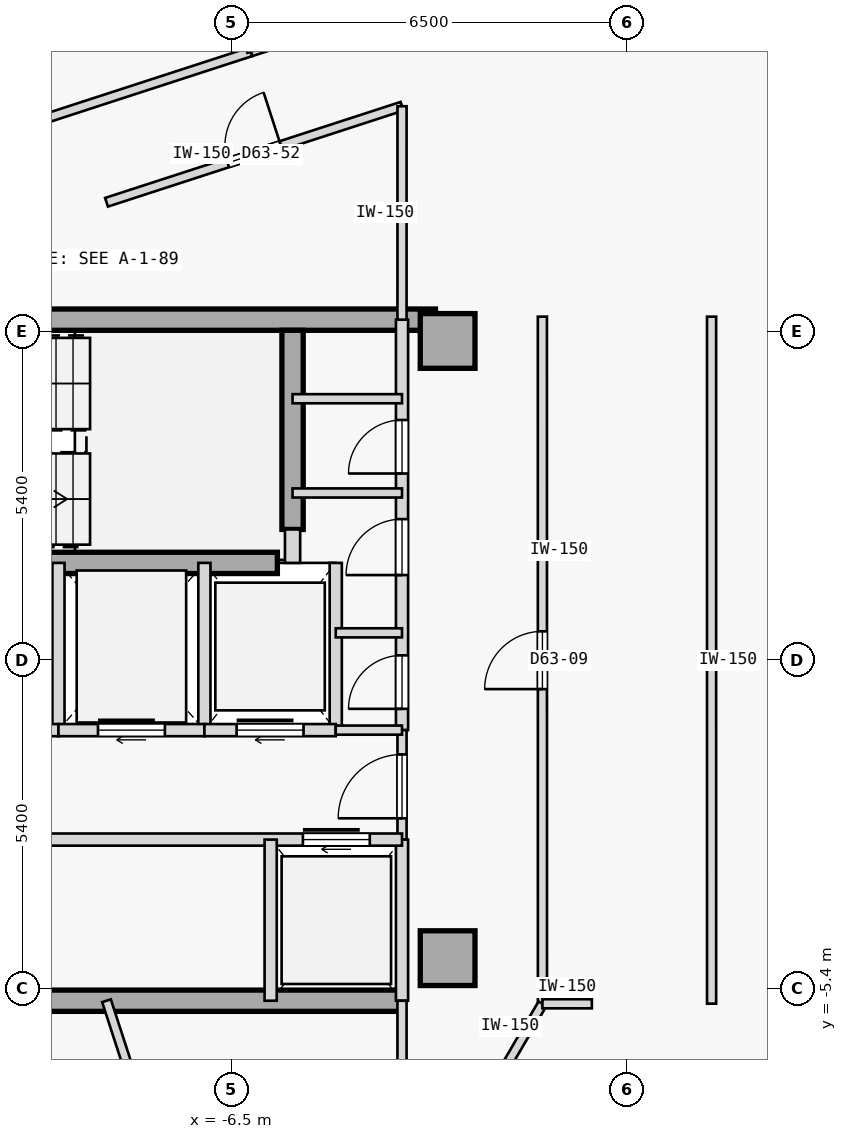
"""IFC4 building model, lengths in metres.
Left out: names, types, materials, properties, quantities, classifications, styles, units other than length and angle.
Written with IfcOpenShell. Run it as: python <this file> out.ifc"""

import sys

from ifc_helpers import new_model, si_unit, direction, frame, frame_2d, origin, origin_2d, place, context, subcontext, project, spatial, rectangle, extrude, element, fill, save


model = new_model("IFC4")
c1 = context("Model", 3, precision=1e-05, world=origin(), true_north=direction((0.0, 1.0)))
c2 = subcontext(c1, "Body", "Model", "MODEL_VIEW")
j1 = project(units=[si_unit("LENGTHUNIT", "METRE"), si_unit("PLANEANGLEUNIT", "RADIAN")], contexts=[c1])
p1 = place(None, origin())
s1 = spatial("IfcSite", under=j1, at=p1, CompositionType="ELEMENT")
p2 = place(p1, origin())
s2 = spatial("IfcBuilding", under=s1, at=p2, CompositionType="ELEMENT")
p3 = place(p2, frame((0.0, 0.0, 237.7)))
s3 = spatial("IfcBuildingStorey", under=s2, at=p3, CompositionType="ELEMENT", Elevation=237.7)
for number, where, z_axis, x_axis in (
    (1, (-2.95, -4.9, 0.0), (0.0, 0.0, 1.0), (1.0, 0.0, 0.0)),
    (2, (-2.95, 5.25, 0.0), (0.0, 0.0, 1.0), (1.0, 0.0, 0.0)),
):
    element("IfcColumn", number, at=place(p3, frame(where, z_axis=z_axis, x_axis=x_axis)), inside=s3, PredefinedType="COLUMN", context=c2, shape_type="SweptSolid", body=[
        extrude(rectangle(XDim=0.9, YDim=0.9, at=origin_2d()), origin(), (0.0, 0.0, 1.0), 3.35),
    ])
p4 = place(p3, frame((-14.56, 5.6, 0.0), z_axis=(0.0, 0.0, 1.0), x_axis=(1.0, 0.0, 0.0)))
e3 = element("IfcWall", 3, at=p4, inside=s3, PredefinedType="SHEAR", context=c2, shape_type="SweptSolid", body=[
    extrude(rectangle(XDim=11.41, YDim=0.35, at=frame_2d((5.705, 0.0))), origin(), (0.0, 0.0, 1.0), 3.125),
])
p5 = place(p3, frame((-14.56, -5.6, 0.0), z_axis=(0.0, 0.0, 1.0), x_axis=(1.0, 0.0, 0.0)))
e4 = element("IfcWall", 4, at=p5, inside=s3, PredefinedType="SHEAR", context=c2, shape_type="SweptSolid", body=[
    extrude(rectangle(XDim=10.86, YDim=0.35, at=frame_2d((5.43, 0.0))), origin(), (0.0, 0.0, 1.0), 3.125),
])
p6 = place(p3, frame((-5.5, 2.15, 0.0), z_axis=(0.0, 0.0, 1.0), x_axis=(0.0, 1.0, 0.0)))
e5 = element("IfcWall", 5, at=p6, inside=s3, PredefinedType="SHEAR", context=c2, shape_type="SweptSolid", body=[
    extrude(rectangle(XDim=3.275, YDim=0.35, at=frame_2d((1.638, 0.0))), origin(), (0.0, 0.0, 1.0), 3.125),
])
p7 = place(p3, frame((-10.9, 1.6, 0.0), z_axis=(0.0, 0.0, 1.0), x_axis=(1.0, 0.0, 0.0)))
e6 = element("IfcWall", 6, at=p7, inside=s3, PredefinedType="SHEAR", context=c2, shape_type="SweptSolid", body=[
    extrude(rectangle(XDim=5.15, YDim=0.35, at=frame_2d((2.575, 0.0))), origin(), (0.0, 0.0, 1.0), 3.125),
])
p8 = place(p3, frame((-5.5, 1.6, 0.0), z_axis=(0.0, 0.0, 1.0), x_axis=(0.0, 1.0, 0.0)))
e7 = element("IfcWall", 7, at=p8, inside=s3, PredefinedType="STANDARD", context=c2, shape_type="SweptSolid", body=[
    extrude(rectangle(XDim=0.55, YDim=0.25, at=frame_2d((0.275, 0.0))), origin(), (0.0, 0.0, 1.0), 3.125),
])
p9 = place(p3, frame((-3.7, -1.15, 0.0), z_axis=(0.0, 0.0, 1.0), x_axis=(0.0, 1.0, 0.0)))
e8 = element("IfcWall", 8, at=p9, inside=s3, PredefinedType="STANDARD", context=c2, shape_type="SweptSolid", body=[
    extrude(rectangle(XDim=6.75, YDim=0.2, at=frame_2d((3.375, 0.0))), origin(), (0.0, 0.0, 1.0), 3.125),
])
p10 = place(p9, frame((0.35, 0.0, 0.0)))
e9 = element("IfcOpeningElement", 9, at=p10, cuts=e8, PredefinedType="OPENING", context=c2, shape_type="SweptSolid", body=[
    extrude(rectangle(XDim=0.88, YDim=2.15, at=frame_2d((0.44, 1.075))), frame((0.0, 0.11, 0.0), z_axis=(0.0, -1.0, 0.0), x_axis=(1.0, 0.0, 0.0)), (0.0, 0.0, 1.0), 0.22),
])
p11 = place(p9, frame((2.55, 0.0, 0.0)))
e10 = element("IfcOpeningElement", 10, at=p11, cuts=e8, PredefinedType="OPENING", context=c2, shape_type="SweptSolid", body=[
    extrude(rectangle(XDim=0.92, YDim=2.15, at=frame_2d((0.46, 1.075))), frame((0.0, 0.11, 0.0), z_axis=(0.0, -1.0, 0.0), x_axis=(1.0, 0.0, 0.0)), (0.0, 0.0, 1.0), 0.22),
])
p12 = place(p9, frame((4.22, 0.0, 0.0)))
e11 = element("IfcOpeningElement", 11, at=p12, cuts=e8, PredefinedType="OPENING", context=c2, shape_type="SweptSolid", body=[
    extrude(rectangle(XDim=0.88, YDim=2.15, at=frame_2d((0.44, 1.075))), frame((0.0, 0.11, 0.0), z_axis=(0.0, -1.0, 0.0), x_axis=(1.0, 0.0, 0.0)), (0.0, 0.0, 1.0), 0.22),
])
p13 = place(p3, frame((-3.7, -2.95, 0.0), z_axis=(0.0, 0.0, 1.0), x_axis=(0.0, 1.0, 0.0)))
e12 = element("IfcWall", 12, at=p13, inside=s3, PredefinedType="PARTITIONING", context=c2, shape_type="SweptSolid", body=[
    extrude(rectangle(XDim=1.8, YDim=0.15, at=frame_2d((0.9, 0.0))), origin(), (0.0, 0.0, 1.0), 3.125),
])
p14 = place(p13, frame((0.35, 0.0, 0.0)))
e13 = element("IfcOpeningElement", 13, at=p14, cuts=e12, PredefinedType="OPENING", context=c2, shape_type="SweptSolid", body=[
    extrude(rectangle(XDim=1.05, YDim=2.18, at=frame_2d((0.525, 1.09))), frame((0.0, 0.085, 0.0), z_axis=(0.0, -1.0, 0.0), x_axis=(1.0, 0.0, 0.0)), (0.0, 0.0, 1.0), 0.17),
])
p15 = place(p3, frame((-3.7, -5.6, 0.0), z_axis=(0.0, 0.0, 1.0), x_axis=(0.0, 1.0, 0.0)))
e14 = element("IfcWall", 14, at=p15, inside=s3, PredefinedType="STANDARD", context=c2, shape_type="SweptSolid", body=[
    extrude(rectangle(XDim=2.65, YDim=0.2, at=frame_2d((1.325, 0.0))), origin(), (0.0, 0.0, 1.0), 3.125),
])
p16 = place(p3, frame((-9.35, -1.15, 0.0), z_axis=(0.0, 0.0, 1.0), x_axis=(0.0, 1.0, 0.0)))
e15 = element("IfcWall", 15, at=p16, inside=s3, PredefinedType="STANDARD", context=c2, shape_type="SweptSolid", body=[
    extrude(rectangle(XDim=2.75, YDim=0.2, at=frame_2d((1.375, 0.0))), origin(), (0.0, 0.0, 1.0), 3.125),
])
p17 = place(p3, frame((-11.55, -1.15, 0.0), z_axis=(0.0, 0.0, 1.0), x_axis=(1.0, 0.0, 0.0)))
e16 = element("IfcWall", 16, at=p17, inside=s3, PredefinedType="STANDARD", context=c2, shape_type="SweptSolid", body=[
    extrude(rectangle(XDim=2.2, YDim=0.2, at=frame_2d((1.1, 0.0))), origin(), (0.0, 0.0, 1.0), 3.125),
])
p18 = place(p3, frame((-6.95, -1.15, 0.0), z_axis=(0.0, 0.0, 1.0), x_axis=(0.0, 1.0, 0.0)))
e17 = element("IfcWall", 17, at=p18, inside=s3, PredefinedType="STANDARD", context=c2, shape_type="SweptSolid", body=[
    extrude(rectangle(XDim=2.75, YDim=0.2, at=frame_2d((1.375, 0.0))), origin(), (0.0, 0.0, 1.0), 3.125),
])
p19 = place(p3, frame((-9.35, -1.15, 0.0), z_axis=(0.0, 0.0, 1.0), x_axis=(1.0, 0.0, 0.0)))
e18 = element("IfcWall", 18, at=p19, inside=s3, PredefinedType="STANDARD", context=c2, shape_type="SweptSolid", body=[
    extrude(rectangle(XDim=2.4, YDim=0.2, at=frame_2d((1.2, 0.0))), origin(), (0.0, 0.0, 1.0), 3.125),
])
p20 = place(p19, frame((0.65, 0.0, 0.0)))
e19 = element("IfcOpeningElement", 19, at=p20, cuts=e18, PredefinedType="OPENING", context=c2, shape_type="SweptSolid", body=[
    extrude(rectangle(XDim=1.1, YDim=2.15, at=frame_2d((0.55, 1.075))), frame((0.0, 0.11, 0.0), z_axis=(0.0, -1.0, 0.0), x_axis=(1.0, 0.0, 0.0)), (0.0, 0.0, 1.0), 0.22),
])
p21 = place(p3, frame((-4.79, -1.15, 0.0), z_axis=(0.0, 0.0, 1.0), x_axis=(0.0, 1.0, 0.0)))
e20 = element("IfcWall", 20, at=p21, inside=s3, PredefinedType="STANDARD", context=c2, shape_type="SweptSolid", body=[
    extrude(rectangle(XDim=2.75, YDim=0.2, at=frame_2d((1.375, 0.0))), origin(), (0.0, 0.0, 1.0), 3.125),
])
p22 = place(p3, frame((-6.95, -1.15, 0.0), z_axis=(0.0, 0.0, 1.0), x_axis=(1.0, 0.0, 0.0)))
e21 = element("IfcWall", 21, at=p22, inside=s3, PredefinedType="STANDARD", context=c2, shape_type="SweptSolid", body=[
    extrude(rectangle(XDim=2.16, YDim=0.2, at=frame_2d((1.08, 0.0))), origin(), (0.0, 0.0, 1.0), 3.125),
])
p23 = place(p22, frame((0.53, 0.0, 0.0)))
e22 = element("IfcOpeningElement", 22, at=p23, cuts=e21, PredefinedType="OPENING", context=c2, shape_type="SweptSolid", body=[
    extrude(rectangle(XDim=1.1, YDim=2.15, at=frame_2d((0.55, 1.075))), frame((0.0, 0.11, 0.0), z_axis=(0.0, -1.0, 0.0), x_axis=(1.0, 0.0, 0.0)), (0.0, 0.0, 1.0), 0.22),
])
p24 = place(p3, frame((-4.79, -1.15, 0.0), z_axis=(0.0, 0.0, 1.0), x_axis=(1.0, 0.0, 0.0)))
e23 = element("IfcWall", 23, at=p24, inside=s3, PredefinedType="PARTITIONING", context=c2, shape_type="SweptSolid", body=[
    extrude(rectangle(XDim=1.09, YDim=0.15, at=frame_2d((0.545, 0.0))), origin(), (0.0, 0.0, 1.0), 3.125),
])
p25 = place(p3, frame((-14.5, -2.95, 0.0), z_axis=(0.0, 0.0, 1.0), x_axis=(1.0, 0.0, 0.0)))
e24 = element("IfcWall", 24, at=p25, inside=s3, PredefinedType="STANDARD", context=c2, shape_type="SweptSolid", body=[
    extrude(rectangle(XDim=10.8, YDim=0.2, at=frame_2d((5.4, 0.0))), origin(), (0.0, 0.0, 1.0), 3.125),
])
p26 = place(p25, frame((9.17, 0.0, 0.0)))
e25 = element("IfcOpeningElement", 25, at=p26, cuts=e24, PredefinedType="OPENING", context=c2, shape_type="SweptSolid", body=[
    extrude(rectangle(XDim=1.1, YDim=2.15, at=frame_2d((0.55, 1.075))), frame((0.0, 0.11, 0.0), z_axis=(0.0, -1.0, 0.0), x_axis=(1.0, 0.0, 0.0)), (0.0, 0.0, 1.0), 0.22),
])
p27 = place(p25, frame((3.86, 0.0, 0.0)))
e26 = element("IfcOpeningElement", 26, at=p27, cuts=e24, PredefinedType="OPENING", context=c2, shape_type="SweptSolid", body=[
    extrude(rectangle(XDim=0.92, YDim=2.15, at=frame_2d((0.46, 1.075))), frame((0.0, 0.11, 0.0), z_axis=(0.0, -1.0, 0.0), x_axis=(1.0, 0.0, 0.0)), (0.0, 0.0, 1.0), 0.22),
])
p28 = place(p3, frame((-5.86, -5.6, 0.0), z_axis=(0.0, 0.0, 1.0), x_axis=(0.0, 1.0, 0.0)))
e27 = element("IfcWall", 27, at=p28, inside=s3, PredefinedType="STANDARD", context=c2, shape_type="SweptSolid", body=[
    extrude(rectangle(XDim=2.65, YDim=0.2, at=frame_2d((1.325, 0.0))), origin(), (0.0, 0.0, 1.0), 3.125),
])
p29 = place(p3, frame((-5.5, 4.3, 0.0), z_axis=(0.0, 0.0, 1.0), x_axis=(1.0, 0.0, 0.0)))
e28 = element("IfcWall", 28, at=p29, inside=s3, PredefinedType="PARTITIONING", context=c2, shape_type="SweptSolid", body=[
    extrude(rectangle(XDim=1.8, YDim=0.15, at=frame_2d((0.9, 0.0))), origin(), (0.0, 0.0, 1.0), 3.125),
])
p30 = place(p3, frame((-4.79, 0.45, 0.0), z_axis=(0.0, 0.0, 1.0), x_axis=(1.0, 0.0, 0.0)))
e29 = element("IfcWall", 29, at=p30, inside=s3, PredefinedType="PARTITIONING", context=c2, shape_type="SweptSolid", body=[
    extrude(rectangle(XDim=1.09, YDim=0.15, at=frame_2d((0.545, 0.0))), origin(), (0.0, 0.0, 1.0), 3.125),
])
p31 = place(p3, frame((-5.5, 2.75, 0.0), z_axis=(0.0, 0.0, 1.0), x_axis=(1.0, 0.0, 0.0)))
e30 = element("IfcWall", 30, at=p31, inside=s3, PredefinedType="PARTITIONING", context=c2, shape_type="SweptSolid", body=[
    extrude(rectangle(XDim=1.8, YDim=0.15, at=frame_2d((0.9, 0.0))), origin(), (0.0, 0.0, 1.0), 3.125),
])
p32 = place(p3, frame((-1.391, -5.65, 0.0), z_axis=(0.0, 0.0, 1.0), x_axis=(-8.6422954e-05, 0.999999996266, 0.0)))
e31 = element("IfcWall", 31, at=p32, inside=s3, PredefinedType="PARTITIONING", context=c2, shape_type="SweptSolid", body=[
    extrude(rectangle(XDim=11.3, YDim=0.15, at=frame_2d((5.65, 0.0))), origin(), (0.0, 0.0, 1.0), 3.125),
])
p33 = place(p32, frame((5.175, 0.0, 0.0)))
e32 = element("IfcOpeningElement", 32, at=p33, cuts=e31, PredefinedType="OPENING", context=c2, shape_type="SweptSolid", body=[
    extrude(rectangle(XDim=0.95, YDim=2.15, at=frame_2d((0.475, 1.075))), frame((0.0, 0.085, 0.0), z_axis=(0.0, -1.0, 0.0), x_axis=(1.0, 0.0, 0.0)), (0.0, 0.0, 1.0), 0.17),
])
p34 = place(p3, frame((1.391, -5.648, 0.0), z_axis=(0.0, 0.0, 1.0), x_axis=(-4.3218947e-05, 0.999999999066, 0.0)))
e33 = element("IfcWall", 33, at=p34, inside=s3, PredefinedType="PARTITIONING", context=c2, shape_type="SweptSolid", body=[
    extrude(rectangle(XDim=11.298, YDim=0.15, at=frame_2d((5.649, 0.0))), origin(), (0.0, 0.0, 1.0), 3.125),
])
p35 = place(p3, frame((-10.322, 8.661, 0.0), z_axis=(0.0, 0.0, 1.0), x_axis=(0.951052627573, 0.309028962374, 0.0)))
e34 = element("IfcWall", 34, at=p35, inside=s3, PredefinedType="PARTITIONING", context=c2, shape_type="SweptSolid", body=[
    extrude(rectangle(XDim=4.35, YDim=0.15, at=frame_2d((2.175, 0.0))), origin(), (0.0, 0.0, 1.0), 3.125),
])
p36 = place(p3, frame((-6.185, 10.006, 0.0), z_axis=(0.0, 0.0, 1.0), x_axis=(0.951062257173, 0.308999325213, 0.0)))
e35 = element("IfcWall", 35, at=p36, inside=s3, PredefinedType="PARTITIONING", context=c2, shape_type="SweptSolid", body=[
    extrude(rectangle(XDim=3.5, YDim=0.15, at=frame_2d((1.75, 0.0))), origin(), (0.0, 0.0, 1.0), 3.125),
])
p37 = place(p3, frame((-1.98, -6.659, 0.0), z_axis=(0.0, 0.0, 1.0), x_axis=(0.504533622976, 0.863392044952, 0.0)))
e36 = element("IfcWall", 36, at=p37, inside=s3, PredefinedType="PARTITIONING", context=c2, shape_type="SweptSolid", body=[
    extrude(rectangle(XDim=1.168, YDim=0.15, at=frame_2d((0.584, 0.0))), origin(), (0.0, 0.0, 1.0), 3.125),
])
p38 = place(p3, frame((-3.7, -11.514, 0.0), z_axis=(0.0, 0.0, 1.0), x_axis=(-8.2572974e-05, 0.999999996591, 0.0)))
e37 = element("IfcWall", 37, at=p38, inside=s3, PredefinedType="PARTITIONING", context=c2, shape_type="SweptSolid", body=[
    extrude(rectangle(XDim=5.913, YDim=0.15, at=frame_2d((2.957, 0.0))), origin(), (0.0, 0.0, 1.0), 3.125),
])
p39 = place(p38, frame((2.497, 0.0, 0.0)))
e38 = element("IfcOpeningElement", 38, at=p39, cuts=e37, PredefinedType="OPENING", context=c2, shape_type="SweptSolid", body=[
    extrude(rectangle(XDim=0.92, YDim=2.15, at=frame_2d((0.46, 1.075))), frame((0.0, 0.085, 0.0), z_axis=(0.0, -1.0, 0.0), x_axis=(1.0, 0.0, 0.0)), (0.0, 0.0, 1.0), 0.17),
])
p40 = place(p3, frame((-8.56, 7.531, 0.0), z_axis=(0.0, 0.0, 1.0), x_axis=(0.951054430751, 0.309023412946, 0.0)))
e39 = element("IfcWall", 39, at=p40, inside=s3, PredefinedType="PARTITIONING", context=c2, shape_type="SweptSolid", body=[
    extrude(rectangle(XDim=5.11, YDim=0.15, at=frame_2d((2.555, 0.0))), origin(), (0.0, 0.0, 1.0), 3.125),
])
p41 = place(p40, frame((2.095, 0.0, 0.0)))
e40 = element("IfcOpeningElement", 40, at=p41, cuts=e39, PredefinedType="OPENING", context=c2, shape_type="SweptSolid", body=[
    extrude(rectangle(XDim=0.92, YDim=2.15, at=frame_2d((0.46, 1.075))), frame((0.0, 0.085, 0.0), z_axis=(0.0, -1.0, 0.0), x_axis=(1.0, 0.0, 0.0)), (0.0, 0.0, 1.0), 0.17),
])
p42 = place(p3, frame((-3.7, 5.6, 0.0), z_axis=(0.0, 0.0, 1.0), x_axis=(0.000139120755, 0.999999990323, 0.0)))
e41 = element("IfcWall", 41, at=p42, inside=s3, PredefinedType="PARTITIONING", context=c2, shape_type="SweptSolid", body=[
    extrude(rectangle(XDim=3.51, YDim=0.15, at=frame_2d((1.755, 0.0))), origin(), (0.0, 0.0, 1.0), 3.125),
])
p43 = place(p3, frame((-1.391, -5.65, 0.0), z_axis=(0.0, 0.0, 1.0), x_axis=(0.999999954883, 0.000300390494, 0.0)))
e42 = element("IfcWall", 42, at=p43, inside=s3, PredefinedType="PARTITIONING", context=c2, shape_type="SweptSolid", body=[
    extrude(rectangle(XDim=0.813, YDim=0.15, at=frame_2d((0.406, 0.0))), origin(), (0.0, 0.0, 1.0), 3.125),
])
p44 = place(p3, frame((-6.185, 10.006, 0.0), z_axis=(0.0, 0.0, 1.0), x_axis=(-0.308948390121, 0.951078804433, 0.0)))
e43 = element("IfcWall", 43, at=p44, inside=s3, PredefinedType="PARTITIONING", context=c2, shape_type="SweptSolid", body=[
    extrude(rectangle(XDim=2.005, YDim=0.12, at=frame_2d((1.002, 0.0))), origin(), (0.0, 0.0, 1.0), 3.125),
])
p45 = place(p3, frame((-6.358, -12.377, 0.0), z_axis=(0.0, 0.0, 1.0), x_axis=(-0.309024097906, 0.951054208189, 0.0)))
e44 = element("IfcWall", 44, at=p45, inside=s3, PredefinedType="PARTITIONING", context=c2, shape_type="SweptSolid", body=[
    extrude(rectangle(XDim=7.126, YDim=0.15, at=frame_2d((3.563, 0.0))), origin(), (0.0, 0.0, 1.0), 2.675),
])
p46 = place(p14, origin())
e45 = element("IfcDoor", 45, at=p46, inside=s3, OperationType="SINGLE_SWING_LEFT", PredefinedType="DOOR", context=c2, shape_type="SweptSolid", body=[
    extrude(rectangle(XDim=1.05, YDim=2.18, at=frame_2d((0.525, 1.09))), frame((0.0, 0.025, 0.0), z_axis=(0.0, -1.0, 0.0), x_axis=(1.0, 0.0, 0.0)), (0.0, 0.0, 1.0), 0.05),
])
fill(e13, e45)
p47 = place(p20, origin())
e46 = element("IfcDoor", 46, at=p47, inside=s3, OperationType="SLIDING_TO_RIGHT", PredefinedType="DOOR", context=c2, shape_type="SweptSolid", body=[
    extrude(rectangle(XDim=1.1, YDim=2.15, at=frame_2d((0.55, 1.075))), frame((0.0, 0.025, 0.0), z_axis=(0.0, -1.0, 0.0), x_axis=(1.0, 0.0, 0.0)), (0.0, 0.0, 1.0), 0.05),
])
fill(e19, e46)
p48 = place(p23, origin())
e47 = element("IfcDoor", 47, at=p48, inside=s3, OperationType="SLIDING_TO_RIGHT", PredefinedType="DOOR", context=c2, shape_type="SweptSolid", body=[
    extrude(rectangle(XDim=1.1, YDim=2.15, at=frame_2d((0.55, 1.075))), frame((0.0, 0.025, 0.0), z_axis=(0.0, -1.0, 0.0), x_axis=(1.0, 0.0, 0.0)), (0.0, 0.0, 1.0), 0.05),
])
fill(e22, e47)
p49 = place(p26, origin())
e48 = element("IfcDoor", 48, at=p49, inside=s3, OperationType="SLIDING_TO_RIGHT", PredefinedType="DOOR", context=c2, shape_type="SweptSolid", body=[
    extrude(rectangle(XDim=1.1, YDim=2.15, at=frame_2d((0.55, 1.075))), frame((0.0, 0.025, 0.0), z_axis=(0.0, -1.0, 0.0), x_axis=(1.0, 0.0, 0.0)), (0.0, 0.0, 1.0), 0.05),
])
fill(e25, e48)
p50 = place(p10, origin())
e49 = element("IfcDoor", 49, at=p50, inside=s3, OperationType="SINGLE_SWING_LEFT", PredefinedType="DOOR", context=c2, shape_type="SweptSolid", body=[
    extrude(rectangle(XDim=0.88, YDim=2.15, at=frame_2d((0.44, 1.075))), frame((0.0, 0.025, 0.0), z_axis=(0.0, -1.0, 0.0), x_axis=(1.0, 0.0, 0.0)), (0.0, 0.0, 1.0), 0.05),
])
fill(e9, e49)
p51 = place(p11, origin())
e50 = element("IfcDoor", 50, at=p51, inside=s3, OperationType="SINGLE_SWING_LEFT", PredefinedType="DOOR", context=c2, shape_type="SweptSolid", body=[
    extrude(rectangle(XDim=0.92, YDim=2.15, at=frame_2d((0.46, 1.075))), frame((0.0, 0.025, 0.0), z_axis=(0.0, -1.0, 0.0), x_axis=(1.0, 0.0, 0.0)), (0.0, 0.0, 1.0), 0.05),
])
fill(e10, e50)
p52 = place(p12, origin())
e51 = element("IfcDoor", 51, at=p52, inside=s3, OperationType="SINGLE_SWING_LEFT", PredefinedType="DOOR", context=c2, shape_type="SweptSolid", body=[
    extrude(rectangle(XDim=0.88, YDim=2.15, at=frame_2d((0.44, 1.075))), frame((0.0, 0.025, 0.0), z_axis=(0.0, -1.0, 0.0), x_axis=(1.0, 0.0, 0.0)), (0.0, 0.0, 1.0), 0.05),
])
fill(e11, e51)
p53 = place(p33, origin())
e52 = element("IfcDoor", 52, at=p53, inside=s3, OperationType="SINGLE_SWING_LEFT", PredefinedType="DOOR", context=c2, shape_type="SweptSolid", body=[
    extrude(rectangle(XDim=0.95, YDim=2.15, at=frame_2d((0.475, 1.075))), frame((0.0, 0.025, 0.0), z_axis=(0.0, -1.0, 0.0), x_axis=(1.0, 0.0, 0.0)), (0.0, 0.0, 1.0), 0.05),
])
fill(e32, e52)
p54 = place(p41, origin())
e53 = element("IfcDoor", 53, at=p54, inside=s3, OperationType="SINGLE_SWING_RIGHT", PredefinedType="DOOR", context=c2, shape_type="SweptSolid", body=[
    extrude(rectangle(XDim=0.92, YDim=2.15, at=frame_2d((0.46, 1.075))), frame((0.0, 0.025, 0.0), z_axis=(0.0, -1.0, 0.0), x_axis=(1.0, 0.0, 0.0)), (0.0, 0.0, 1.0), 0.05),
])
fill(e40, e53)
save(model, sys.argv[1])
